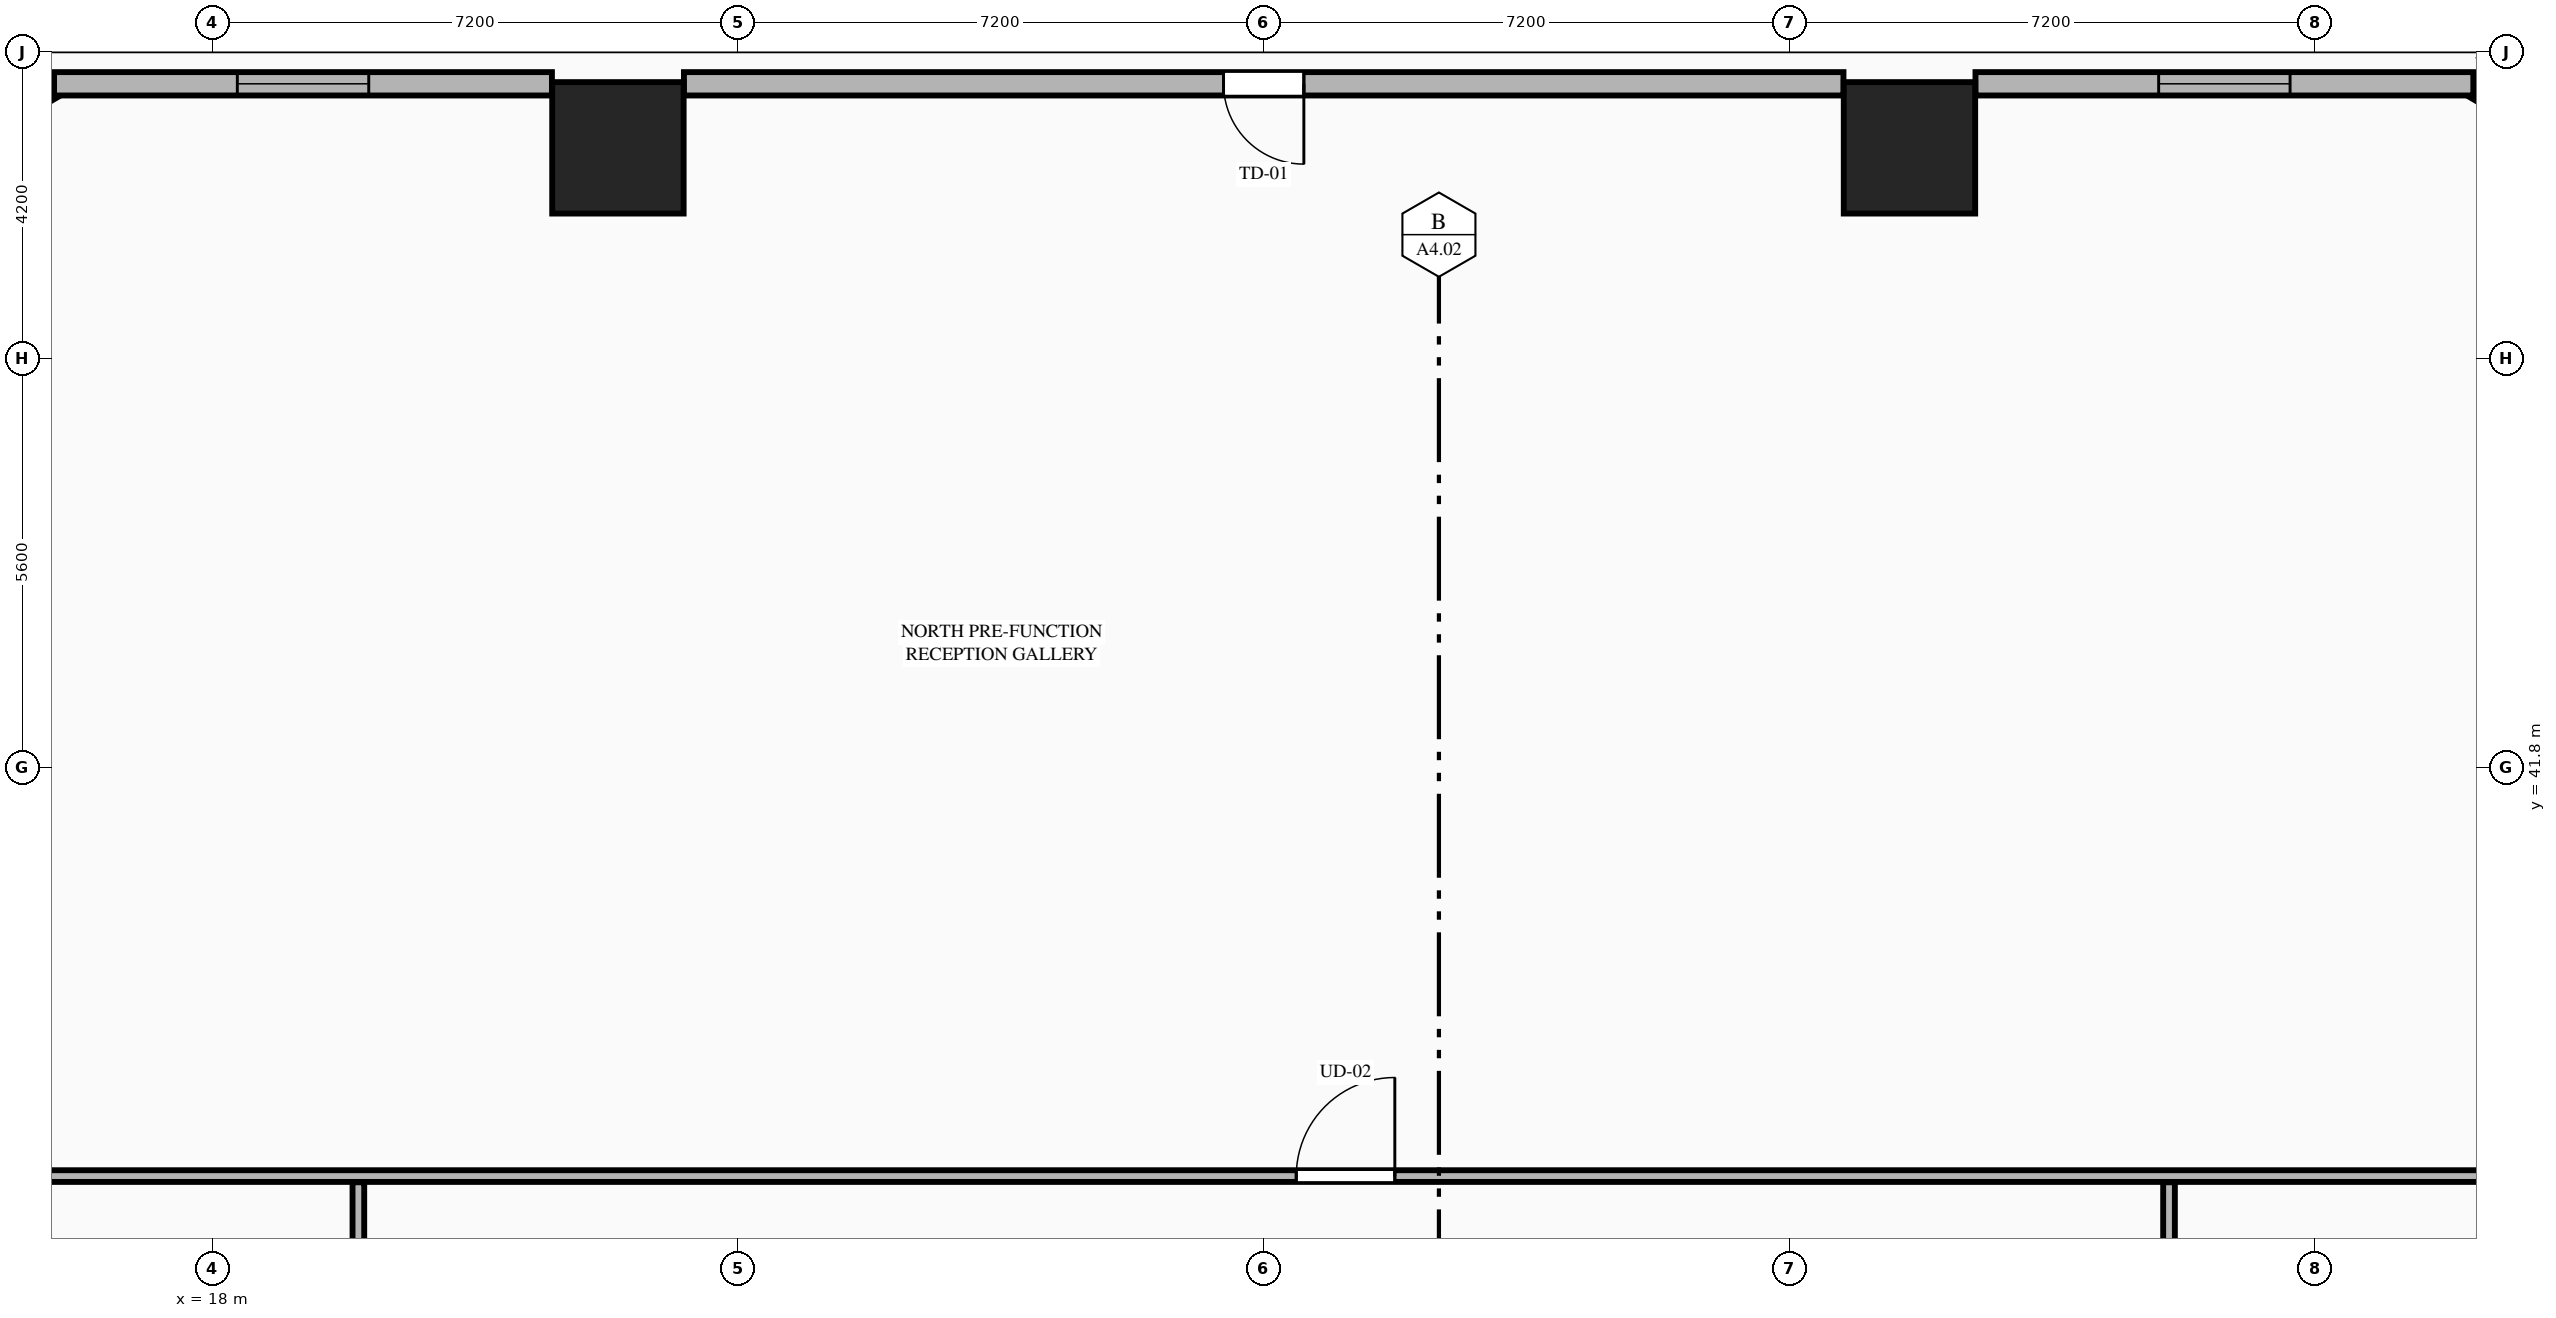
"""IFC4 building model, lengths in metres.
Left out: names, types, materials, properties, quantities, classifications, styles, units other than length and angle.
Written with IfcOpenShell. Run it as: python <this file> out.ifc"""

import sys

from ifc_helpers import new_model, si_unit, direction, frame, frame_2d, origin, origin_2d, place, context, subcontext, project, spatial, rectangle, extrude, element, fill, save


model = new_model("IFC4")
c1 = context("Model", 3, precision=1e-05, world=origin(), true_north=direction((0.0, 1.0)))
c2 = subcontext(c1, "Body", "Model", "MODEL_VIEW")
j1 = project(units=[si_unit("LENGTHUNIT", "METRE"), si_unit("PLANEANGLEUNIT", "RADIAN")], contexts=[c1])
p1 = place(None, origin())
s1 = spatial("IfcSite", under=j1, at=p1, CompositionType="ELEMENT")
p2 = place(p1, origin())
s2 = spatial("IfcBuilding", under=s1, at=p2, CompositionType="ELEMENT")
p3 = place(p2, frame((0.0, 0.0, 10.5)))
s3 = spatial("IfcBuildingStorey", under=s2, at=p3, CompositionType="ELEMENT", Elevation=10.5)
for number, where, z_axis, x_axis in (
    (1, (41.245, 50.283, 0.0), (0.0, 0.0, 1.0), (1.0, 0.0, 0.0)),
    (2, (23.555, 50.283, 0.0), (0.0, 0.0, 1.0), (1.0, 0.0, 0.0)),
):
    element("IfcColumn", number, at=place(p3, frame(where, z_axis=z_axis, x_axis=x_axis)), inside=s3, PredefinedType="COLUMN", context=c2, shape_type="SweptSolid", body=[
        extrude(rectangle(XDim=1.8, YDim=1.8, at=origin_2d()), origin(), (0.0, 0.0, 1.0), 4.5),
    ])
p4 = place(p3, frame((20.0, 17.8, 0.0), z_axis=(0.0, 0.0, 1.0), x_axis=(0.0, 1.0, 0.0)))
e3 = element("IfcWall", 3, at=p4, inside=s3, PredefinedType="PARTITIONING", context=c2, shape_type="SweptSolid", body=[
    extrude(rectangle(XDim=18.315, YDim=0.16, at=frame_2d((9.157, 0.0))), origin(), (0.0, 0.0, 1.0), 4.25),
])
p5 = place(p4, frame((3.8, 0.0, 0.0)))
e4 = element("IfcOpeningElement", 4, at=p5, cuts=e3, PredefinedType="OPENING", context=c2, shape_type="SweptSolid", body=[
    extrude(rectangle(XDim=1.35, YDim=2.35, at=frame_2d((0.675, 1.175))), frame((0.0, 0.09, 0.0), z_axis=(0.0, -1.0, 0.0), x_axis=(1.0, 0.0, 0.0)), (0.0, 0.0, 1.0), 0.18),
])
p6 = place(p4, frame((13.0, 0.0, 0.0)))
e5 = element("IfcOpeningElement", 5, at=p6, cuts=e3, PredefinedType="OPENING", context=c2, shape_type="SweptSolid", body=[
    extrude(rectangle(XDim=1.02, YDim=2.25, at=frame_2d((0.51, 1.125))), frame((0.0, 0.09, 0.0), z_axis=(0.0, -1.0, 0.0), x_axis=(1.0, 0.0, 0.0)), (0.0, 0.0, 1.0), 0.18),
])
p7 = place(p3, frame((44.8, 17.8, 0.0), z_axis=(0.0, 0.0, 1.0), x_axis=(0.0, 1.0, 0.0)))
e6 = element("IfcWall", 6, at=p7, inside=s3, PredefinedType="PARTITIONING", context=c2, shape_type="SweptSolid", body=[
    extrude(rectangle(XDim=18.315, YDim=0.16, at=frame_2d((9.157, 0.0))), origin(), (0.0, 0.0, 1.0), 4.25),
])
p8 = place(p7, frame((3.8, 0.0, 0.0)))
e7 = element("IfcOpeningElement", 7, at=p8, cuts=e6, PredefinedType="OPENING", context=c2, shape_type="SweptSolid", body=[
    extrude(rectangle(XDim=1.35, YDim=2.35, at=frame_2d((0.675, 1.175))), frame((0.0, 0.09, 0.0), z_axis=(0.0, -1.0, 0.0), x_axis=(1.0, 0.0, 0.0)), (0.0, 0.0, 1.0), 0.18),
])
p9 = place(p7, frame((13.8, 0.0, 0.0)))
e8 = element("IfcOpeningElement", 8, at=p9, cuts=e6, PredefinedType="OPENING", context=c2, shape_type="SweptSolid", body=[
    extrude(rectangle(XDim=0.86, YDim=2.1, at=frame_2d((0.43, 1.05))), frame((0.0, 0.09, 0.0), z_axis=(0.0, -1.0, 0.0), x_axis=(1.0, 0.0, 0.0)), (0.0, 0.0, 1.0), 0.18),
])
p10 = place(p7, frame((16.3, 0.0, 0.0)))
e9 = element("IfcOpeningElement", 9, at=p10, cuts=e6, PredefinedType="OPENING", context=c2, shape_type="SweptSolid", body=[
    extrude(rectangle(XDim=0.96, YDim=2.15, at=frame_2d((0.48, 1.075))), frame((0.0, 0.09, 0.0), z_axis=(0.0, -1.0, 0.0), x_axis=(1.0, 0.0, 0.0)), (0.0, 0.0, 1.0), 0.18),
])
p11 = place(p3, frame((6.346, 36.2, 0.0), z_axis=(0.0, 0.0, 1.0), x_axis=(1.0, 0.0, 0.0)))
e10 = element("IfcWall", 10, at=p11, inside=s3, PredefinedType="PARTITIONING", context=c2, shape_type="SweptSolid", body=[
    extrude(rectangle(XDim=52.108, YDim=0.16, at=frame_2d((26.054, 0.0))), origin(), (0.0, 0.0, 1.0), 4.25),
])
p12 = place(p11, frame((6.5, 0.0, 0.0)))
e11 = element("IfcOpeningElement", 11, at=p12, cuts=e10, PredefinedType="OPENING", context=c2, shape_type="SweptSolid", body=[
    extrude(rectangle(XDim=1.35, YDim=2.35, at=frame_2d((0.675, 1.175))), frame((0.0, 0.09, 0.0), z_axis=(0.0, -1.0, 0.0), x_axis=(1.0, 0.0, 0.0)), (0.0, 0.0, 1.0), 0.18),
])
p13 = place(p11, frame((26.5, 0.0, 0.0)))
e12 = element("IfcOpeningElement", 12, at=p13, cuts=e10, PredefinedType="OPENING", context=c2, shape_type="SweptSolid", body=[
    extrude(rectangle(XDim=1.35, YDim=2.35, at=frame_2d((0.675, 1.175))), frame((0.0, 0.09, 0.0), z_axis=(0.0, -1.0, 0.0), x_axis=(1.0, 0.0, 0.0)), (0.0, 0.0, 1.0), 0.18),
])
p14 = place(p3, frame((50.903, 49.992, 0.0), z_axis=(0.0, 0.0, 1.0), x_axis=(-0.861209017918, 0.508250949293, 0.0)))
e13 = element("IfcWall", 13, at=p14, inside=s3, PredefinedType="STANDARD", context=c2, shape_type="SweptSolid", body=[
    extrude(rectangle(XDim=2.253, YDim=0.32, at=frame_2d((1.126, 0.0))), origin(), (0.0, 0.0, 1.0), 4.25),
])
p15 = place(p3, frame((15.837, 51.137, 0.0), z_axis=(0.0, 0.0, 1.0), x_axis=(-0.861181020205, -0.508298387209, 0.0)))
e14 = element("IfcWall", 14, at=p15, inside=s3, PredefinedType="STANDARD", context=c2, shape_type="SweptSolid", body=[
    extrude(rectangle(XDim=2.253, YDim=0.32, at=frame_2d((1.126, 0.0))), origin(), (0.0, 0.0, 1.0), 4.25),
])
p16 = place(p3, frame((48.968, 51.16, 0.0), z_axis=(0.0, 0.0, 1.0), x_axis=(-1.0, 0.0, 0.0)))
e15 = element("IfcWall", 15, at=p16, inside=s3, PredefinedType="STANDARD", context=c2, shape_type="SweptSolid", body=[
    extrude(rectangle(XDim=6.819, YDim=0.32, at=frame_2d((3.41, 0.0))), origin(), (0.0, 0.0, 1.0), 4.25),
])
p17 = place(p16, frame((2.51, 0.0, 0.75)))
e16 = element("IfcOpeningElement", 16, at=p17, cuts=e15, PredefinedType="OPENING", context=c2, shape_type="SweptSolid", body=[
    extrude(rectangle(XDim=1.8, YDim=2.4, at=frame_2d((0.9, 1.2))), frame((0.0, 0.17, 0.0), z_axis=(0.0, -1.0, 0.0), x_axis=(1.0, 0.0, 0.0)), (0.0, 0.0, 1.0), 0.34),
])
p18 = place(p3, frame((40.341, 51.16, 0.0), z_axis=(0.0, 0.0, 1.0), x_axis=(-1.0, 0.0, 0.0)))
e17 = element("IfcWall", 17, at=p18, inside=s3, PredefinedType="STANDARD", context=c2, shape_type="SweptSolid", body=[
    extrude(rectangle(XDim=15.882, YDim=0.32, at=frame_2d((7.941, 0.0))), origin(), (0.0, 0.0, 1.0), 4.25),
])
p19 = place(p18, frame((7.391, 0.0, 0.0)))
e18 = element("IfcOpeningElement", 18, at=p19, cuts=e17, PredefinedType="OPENING", context=c2, shape_type="SweptSolid", body=[
    extrude(rectangle(XDim=1.1, YDim=2.25, at=frame_2d((0.55, 1.125))), frame((0.0, 0.17, 0.0), z_axis=(0.0, -1.0, 0.0), x_axis=(1.0, 0.0, 0.0)), (0.0, 0.0, 1.0), 0.34),
])
p20 = place(p3, frame((22.651, 51.16, 0.0), z_axis=(0.0, 0.0, 1.0), x_axis=(-1.0, 0.0, 0.0)))
e19 = element("IfcWall", 19, at=p20, inside=s3, PredefinedType="STANDARD", context=c2, shape_type="SweptSolid", body=[
    extrude(rectangle(XDim=6.819, YDim=0.32, at=frame_2d((3.409, 0.0))), origin(), (0.0, 0.0, 1.0), 4.25),
])
p21 = place(p20, frame((2.509, 0.0, 0.75)))
e20 = element("IfcOpeningElement", 20, at=p21, cuts=e19, PredefinedType="OPENING", context=c2, shape_type="SweptSolid", body=[
    extrude(rectangle(XDim=1.8, YDim=2.4, at=frame_2d((0.9, 1.2))), frame((0.0, 0.17, 0.0), z_axis=(0.0, -1.0, 0.0), x_axis=(1.0, 0.0, 0.0)), (0.0, 0.0, 1.0), 0.34),
])
p22 = place(p13, origin())
e21 = element("IfcDoor", 21, at=p22, inside=s3, OperationType="SINGLE_SWING_RIGHT", PredefinedType="DOOR", context=c2, shape_type="SweptSolid", body=[
    extrude(rectangle(XDim=1.35, YDim=2.35, at=frame_2d((0.675, 1.175))), frame((0.0, 0.025, 0.0), z_axis=(0.0, -1.0, 0.0), x_axis=(1.0, 0.0, 0.0)), (0.0, 0.0, 1.0), 0.05),
])
fill(e12, e21)
p23 = place(p17, origin())
e22 = element("IfcWindow", 22, at=p23, inside=s3, PartitioningType="SINGLE_PANEL", PredefinedType="WINDOW", context=c2, shape_type="SweptSolid", body=[
    extrude(rectangle(XDim=1.8, YDim=2.4, at=frame_2d((0.9, 1.2))), frame((0.0, 0.03, 0.0), z_axis=(0.0, -1.0, 0.0), x_axis=(1.0, 0.0, 0.0)), (0.0, 0.0, 1.0), 0.06),
])
fill(e16, e22)
p24 = place(p19, origin())
e23 = element("IfcDoor", 23, at=p24, inside=s3, OperationType="SINGLE_SWING_LEFT", PredefinedType="DOOR", context=c2, shape_type="SweptSolid", body=[
    extrude(rectangle(XDim=1.1, YDim=2.25, at=frame_2d((0.55, 1.125))), frame((0.0, 0.025, 0.0), z_axis=(0.0, -1.0, 0.0), x_axis=(1.0, 0.0, 0.0)), (0.0, 0.0, 1.0), 0.05),
])
fill(e18, e23)
p25 = place(p21, origin())
e24 = element("IfcWindow", 24, at=p25, inside=s3, PartitioningType="SINGLE_PANEL", PredefinedType="WINDOW", context=c2, shape_type="SweptSolid", body=[
    extrude(rectangle(XDim=1.8, YDim=2.4, at=frame_2d((0.9, 1.2))), frame((0.0, 0.03, 0.0), z_axis=(0.0, -1.0, 0.0), x_axis=(1.0, 0.0, 0.0)), (0.0, 0.0, 1.0), 0.06),
])
fill(e20, e24)
save(model, sys.argv[1])
